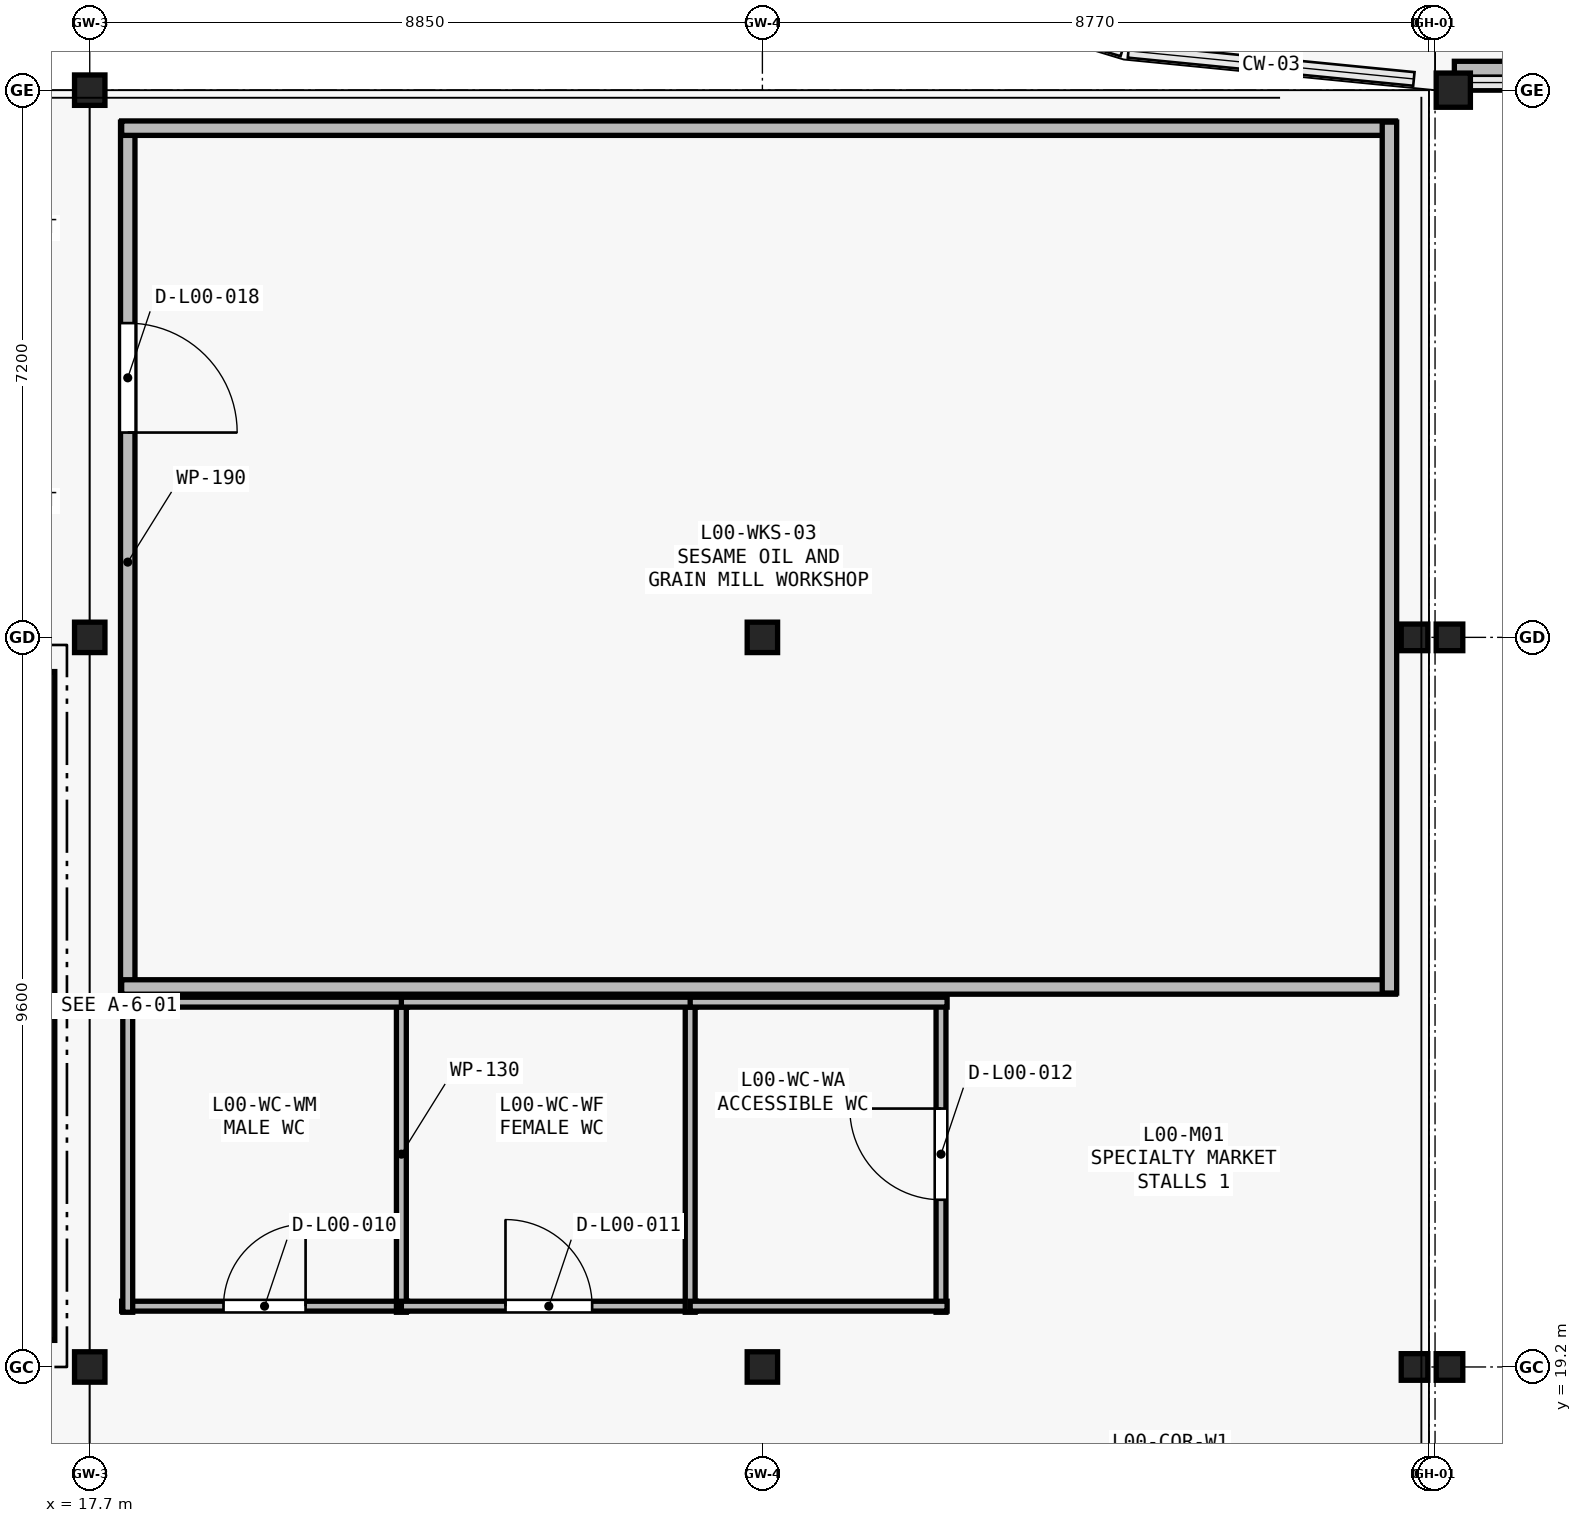
"""IFC4 building model, lengths in metres.
Left out: names, types, materials, properties, quantities, classifications, styles, units other than length and angle.
Written with IfcOpenShell. Run it as: python <this file> out.ifc"""

import sys

from ifc_helpers import new_model, si_unit, direction, frame, frame_2d, origin, origin_2d, place, context, subcontext, project, spatial, rectangle, i_section, extrude, element, fill, save


model = new_model("IFC4")
c1 = context("Model", 3, precision=1e-05, world=origin(), true_north=direction((0.0, 1.0)))
c2 = subcontext(c1, "Body", "Model", "MODEL_VIEW")
j1 = project(units=[si_unit("LENGTHUNIT", "METRE"), si_unit("PLANEANGLEUNIT", "RADIAN")], contexts=[c1])
p1 = place(None, origin())
s1 = spatial("IfcSite", under=j1, at=p1, CompositionType="ELEMENT")
p2 = place(p1, origin())
s2 = spatial("IfcBuilding", under=s1, at=p2, CompositionType="ELEMENT")
p3 = place(p2, origin())
s3 = spatial("IfcBuildingStorey", under=s2, at=p3, CompositionType="ELEMENT", Elevation=0.0)
for number, where, z_axis, x_axis in (
    (1, (17.7, 19.2, 0.0), (0.0, 0.0, 1.0), (1.0, 0.0, 0.0)),
    (2, (17.7, 28.8, 0.0), (0.0, 0.0, 1.0), (1.0, 0.0, 0.0)),
    (3, (17.7, 36.0, 0.0), (0.0, 0.0, 1.0), (1.0, 0.0, 0.0)),
    (4, (26.55, 19.2, 0.0), (0.0, 0.0, 1.0), (1.0, 0.0, 0.0)),
    (5, (26.55, 28.8, 0.0), (0.0, 0.0, 1.0), (1.0, 0.0, 0.0)),
):
    element("IfcColumn", number, at=place(p3, frame(where, z_axis=z_axis, x_axis=x_axis)), inside=s3, PredefinedType="COLUMN", context=c2, shape_type="SweptSolid", body=[
        extrude(i_section(OverallWidth=0.4, OverallDepth=0.4, WebThickness=0.013, FlangeThickness=0.021, FilletRadius=0.022, at=origin_2d()), origin(), (0.0, 0.0, 1.0), 6.0),
    ])
for number, where, z_axis, x_axis in (
    (6, (35.13, 19.2, 0.0), (0.0, 0.0, 1.0), (1.0, 0.0, 0.0)),
    (7, (35.13, 28.8, 0.0), (0.0, 0.0, 1.0), (1.0, 0.0, 0.0)),
    (8, (35.59, 19.2, 0.0), (0.0, 0.0, 1.0), (1.0, 0.0, 0.0)),
    (9, (35.59, 28.8, 0.0), (0.0, 0.0, 1.0), (1.0, 0.0, 0.0)),
):
    element("IfcColumn", number, at=place(p3, frame(where, z_axis=z_axis, x_axis=x_axis)), inside=s3, PredefinedType="COLUMN", context=c2, shape_type="SweptSolid", body=[
        extrude(i_section(OverallWidth=0.35, OverallDepth=0.35, WebThickness=0.012, FlangeThickness=0.019, FilletRadius=0.02, at=origin_2d()), origin(), (0.0, 0.0, 1.0), 6.0),
    ])
p4 = place(p3, frame((35.64, 36.0, 0.0), z_axis=(0.0, 0.0, 1.0), x_axis=(1.0, 0.0, 0.0)))
e10 = element("IfcColumn", 10, at=p4, inside=s3, PredefinedType="COLUMN", context=c2, shape_type="SweptSolid", body=[
    extrude(i_section(OverallWidth=0.45, OverallDepth=0.45, WebThickness=0.014, FlangeThickness=0.024, FilletRadius=0.024, at=origin_2d()), origin(), (0.0, 0.0, 1.0), 6.0),
])
p5 = place(p3, frame((44.986, 36.19, 0.0), z_axis=(0.0, 0.0, 1.0), x_axis=(-1.0, 0.0, 0.0)))
e11 = element("IfcWall", 11, at=p5, inside=s3, PredefinedType="SOLIDWALL", context=c2, shape_type="SweptSolid", body=[
    extrude(rectangle(XDim=9.332, YDim=0.38, at=frame_2d((4.666, 0.0))), origin(), (0.0, 0.0, 1.0), 3.2),
])
p6 = place(p5, frame((3.686, 0.0, 0.0)))
e12 = element("IfcOpeningElement", 12, at=p6, cuts=e11, PredefinedType="OPENING", context=c2, shape_type="SweptSolid", body=[
    extrude(rectangle(XDim=2.0, YDim=2.2, at=frame_2d((1.0, 1.1))), frame((0.0, 0.2, 0.0), z_axis=(0.0, -1.0, 0.0), x_axis=(1.0, 0.0, 0.0)), (0.0, 0.0, 1.0), 0.4),
])
p7 = place(p5, frame((0.886, 0.0, 0.85)))
e13 = element("IfcOpeningElement", 13, at=p7, cuts=e11, PredefinedType="OPENING", context=c2, shape_type="SweptSolid", body=[
    extrude(rectangle(XDim=1.5, YDim=1.8, at=frame_2d((0.75, 0.9))), frame((0.0, 0.2, 0.0), z_axis=(0.0, -1.0, 0.0), x_axis=(1.0, 0.0, 0.0)), (0.0, 0.0, 1.0), 0.4),
])
p8 = place(p3, frame((17.05, 19.55, 0.0), z_axis=(0.0, 0.0, 1.0), x_axis=(0.0, 1.0, 0.0)))
e14 = element("IfcWall", 14, at=p8, inside=s3, PredefinedType="SHEAR", context=c2, shape_type="SweptSolid", body=[
    extrude(rectangle(XDim=8.8, YDim=0.38, at=frame_2d((4.4, 0.0))), origin(), (0.0, 0.0, 1.0), 6.0),
])
p9 = place(p3, frame((18.12, 20.0, 0.0), z_axis=(0.0, 0.0, 1.0), x_axis=(1.0, 0.0, 0.0)))
e15 = element("IfcWall", 15, at=p9, inside=s3, PredefinedType="PARTITIONING", context=c2, shape_type="SweptSolid", body=[
    extrude(rectangle(XDim=3.76, YDim=0.13, at=frame_2d((1.88, 0.0))), origin(), (0.0, 0.0, 1.0), 5.52),
])
p10 = place(p9, frame((1.34, 0.0, 0.0)))
e16 = element("IfcOpeningElement", 16, at=p10, cuts=e15, PredefinedType="OPENING", context=c2, shape_type="SweptSolid", body=[
    extrude(rectangle(XDim=1.08, YDim=2.22, at=frame_2d((0.54, 1.11))), frame((0.0, 0.075, 0.0), z_axis=(0.0, -1.0, 0.0), x_axis=(1.0, 0.0, 0.0)), (0.0, 0.0, 1.0), 0.15),
])
for number, where, z_axis, x_axis in (
    (17, (21.8, 19.92, 0.0), (0.0, 0.0, 1.0), (0.0, 1.0, 0.0)),
    (18, (18.2, 24.08, 0.0), (0.0, 0.0, 1.0), (0.0, -1.0, 0.0)),
):
    element("IfcWall", number, at=place(p3, frame(where, z_axis=z_axis, x_axis=x_axis)), inside=s3, PredefinedType="PARTITIONING", context=c2, shape_type="SweptSolid", body=[
        extrude(rectangle(XDim=4.16, YDim=0.13, at=frame_2d((2.08, 0.0))), origin(), (0.0, 0.0, 1.0), 5.52),
    ])
p11 = place(p3, frame((21.88, 24.0, 0.0), z_axis=(0.0, 0.0, 1.0), x_axis=(-1.0, 0.0, 0.0)))
e19 = element("IfcWall", 19, at=p11, inside=s3, PredefinedType="PARTITIONING", context=c2, shape_type="SweptSolid", body=[
    extrude(rectangle(XDim=3.76, YDim=0.13, at=frame_2d((1.88, 0.0))), origin(), (0.0, 0.0, 1.0), 5.52),
])
p12 = place(p3, frame((21.8, 20.0, 0.0), z_axis=(0.0, 0.0, 1.0), x_axis=(1.0, 0.0, 0.0)))
e20 = element("IfcWall", 20, at=p12, inside=s3, PredefinedType="PARTITIONING", context=c2, shape_type="SweptSolid", body=[
    extrude(rectangle(XDim=3.88, YDim=0.13, at=frame_2d((1.94, 0.0))), origin(), (0.0, 0.0, 1.0), 5.52),
])
p13 = place(p12, frame((1.37, 0.0, 0.0)))
e21 = element("IfcOpeningElement", 21, at=p13, cuts=e20, PredefinedType="OPENING", context=c2, shape_type="SweptSolid", body=[
    extrude(rectangle(XDim=1.14, YDim=2.22, at=frame_2d((0.57, 1.11))), frame((0.0, 0.075, 0.0), z_axis=(0.0, -1.0, 0.0), x_axis=(1.0, 0.0, 0.0)), (0.0, 0.0, 1.0), 0.15),
])
p14 = place(p3, frame((25.6, 19.92, 0.0), z_axis=(0.0, 0.0, 1.0), x_axis=(0.0, 1.0, 0.0)))
e22 = element("IfcWall", 22, at=p14, inside=s3, PredefinedType="PARTITIONING", context=c2, shape_type="SweptSolid", body=[
    extrude(rectangle(XDim=4.16, YDim=0.13, at=frame_2d((2.08, 0.0))), origin(), (0.0, 0.0, 1.0), 5.52),
])
p15 = place(p3, frame((25.68, 24.0, 0.0), z_axis=(0.0, 0.0, 1.0), x_axis=(-1.0, 0.0, 0.0)))
e23 = element("IfcWall", 23, at=p15, inside=s3, PredefinedType="PARTITIONING", context=c2, shape_type="SweptSolid", body=[
    extrude(rectangle(XDim=3.88, YDim=0.13, at=frame_2d((1.94, 0.0))), origin(), (0.0, 0.0, 1.0), 5.52),
])
p16 = place(p3, frame((28.9, 19.92, 0.0), z_axis=(0.0, 0.0, 1.0), x_axis=(0.0, 1.0, 0.0)))
e24 = element("IfcWall", 24, at=p16, inside=s3, PredefinedType="PARTITIONING", context=c2, shape_type="SweptSolid", body=[
    extrude(rectangle(XDim=4.16, YDim=0.13, at=frame_2d((2.08, 0.0))), origin(), (0.0, 0.0, 1.0), 5.52),
])
p17 = place(p16, frame((1.48, 0.0, 0.0)))
e25 = element("IfcOpeningElement", 25, at=p17, cuts=e24, PredefinedType="OPENING", context=c2, shape_type="SweptSolid", body=[
    extrude(rectangle(XDim=1.2, YDim=2.22, at=frame_2d((0.6, 1.11))), frame((0.0, 0.075, 0.0), z_axis=(0.0, -1.0, 0.0), x_axis=(1.0, 0.0, 0.0)), (0.0, 0.0, 1.0), 0.15),
])
for number, where, z_axis, x_axis in (
    (26, (25.6, 20.0, 0.0), (0.0, 0.0, 1.0), (1.0, 0.0, 0.0)),
    (27, (28.98, 24.0, 0.0), (0.0, 0.0, 1.0), (-1.0, 0.0, 0.0)),
):
    element("IfcWall", number, at=place(p3, frame(where, z_axis=z_axis, x_axis=x_axis)), inside=s3, PredefinedType="PARTITIONING", context=c2, shape_type="SweptSolid", body=[
        extrude(rectangle(XDim=3.38, YDim=0.13, at=frame_2d((1.69, 0.0))), origin(), (0.0, 0.0, 1.0), 5.52),
    ])
p18 = place(p3, frame((18.2, 35.58, 0.0), z_axis=(0.0, 0.0, 1.0), x_axis=(0.0, -1.0, 0.0)))
e28 = element("IfcWall", 28, at=p18, inside=s3, PredefinedType="PARTITIONING", context=c2, shape_type="SweptSolid", body=[
    extrude(rectangle(XDim=11.58, YDim=0.19, at=frame_2d((5.79, 0.0))), origin(), (0.0, 0.0, 1.0), 5.52),
])
p19 = place(p18, frame((2.645, 0.0, 0.0)))
e29 = element("IfcOpeningElement", 29, at=p19, cuts=e28, PredefinedType="OPENING", context=c2, shape_type="SweptSolid", body=[
    extrude(rectangle(XDim=1.44, YDim=2.15, at=frame_2d((0.72, 1.075))), frame((0.0, 0.105, 0.0), z_axis=(0.0, -1.0, 0.0), x_axis=(1.0, 0.0, 0.0)), (0.0, 0.0, 1.0), 0.21),
])
for number, where, z_axis, x_axis in (
    (30, (18.12, 24.2, 0.0), (0.0, 0.0, 1.0), (1.0, 0.0, 0.0)),
    (31, (34.88, 35.5, 0.0), (0.0, 0.0, 1.0), (-1.0, 0.0, 0.0)),
):
    element("IfcWall", number, at=place(p3, frame(where, z_axis=z_axis, x_axis=x_axis)), inside=s3, PredefinedType="PARTITIONING", context=c2, shape_type="SweptSolid", body=[
        extrude(rectangle(XDim=16.76, YDim=0.19, at=frame_2d((8.38, 0.0))), origin(), (0.0, 0.0, 1.0), 5.52),
    ])
p20 = place(p3, frame((34.8, 24.12, 0.0), z_axis=(0.0, 0.0, 1.0), x_axis=(0.0, 1.0, 0.0)))
e32 = element("IfcWall", 32, at=p20, inside=s3, PredefinedType="PARTITIONING", context=c2, shape_type="SweptSolid", body=[
    extrude(rectangle(XDim=11.46, YDim=0.19, at=frame_2d((5.73, 0.0))), origin(), (0.0, 0.0, 1.0), 5.52),
])
p21 = place(p10, origin())
e33 = element("IfcDoor", 33, at=p21, inside=s3, OperationType="SINGLE_SWING_RIGHT", PredefinedType="DOOR", context=c2, shape_type="SweptSolid", body=[
    extrude(rectangle(XDim=1.08, YDim=2.22, at=frame_2d((0.54, 1.11))), frame((0.0, 0.025, 0.0), z_axis=(0.0, -1.0, 0.0), x_axis=(1.0, 0.0, 0.0)), (0.0, 0.0, 1.0), 0.05),
])
fill(e16, e33)
p22 = place(p13, origin())
e34 = element("IfcDoor", 34, at=p22, inside=s3, OperationType="SINGLE_SWING_LEFT", PredefinedType="DOOR", context=c2, shape_type="SweptSolid", body=[
    extrude(rectangle(XDim=1.14, YDim=2.22, at=frame_2d((0.57, 1.11))), frame((0.0, 0.025, 0.0), z_axis=(0.0, -1.0, 0.0), x_axis=(1.0, 0.0, 0.0)), (0.0, 0.0, 1.0), 0.05),
])
fill(e21, e34)
p23 = place(p17, origin())
e35 = element("IfcDoor", 35, at=p23, inside=s3, OperationType="SINGLE_SWING_RIGHT", PredefinedType="DOOR", context=c2, shape_type="SweptSolid", body=[
    extrude(rectangle(XDim=1.2, YDim=2.22, at=frame_2d((0.6, 1.11))), frame((0.0, 0.025, 0.0), z_axis=(0.0, -1.0, 0.0), x_axis=(1.0, 0.0, 0.0)), (0.0, 0.0, 1.0), 0.05),
])
fill(e25, e35)
p24 = place(p19, origin())
e36 = element("IfcDoor", 36, at=p24, inside=s3, OperationType="SINGLE_SWING_RIGHT", PredefinedType="DOOR", context=c2, shape_type="SweptSolid", body=[
    extrude(rectangle(XDim=1.44, YDim=2.15, at=frame_2d((0.72, 1.075))), frame((0.0, 0.025, 0.0), z_axis=(0.0, -1.0, 0.0), x_axis=(1.0, 0.0, 0.0)), (0.0, 0.0, 1.0), 0.05),
])
fill(e29, e36)
save(model, sys.argv[1])
